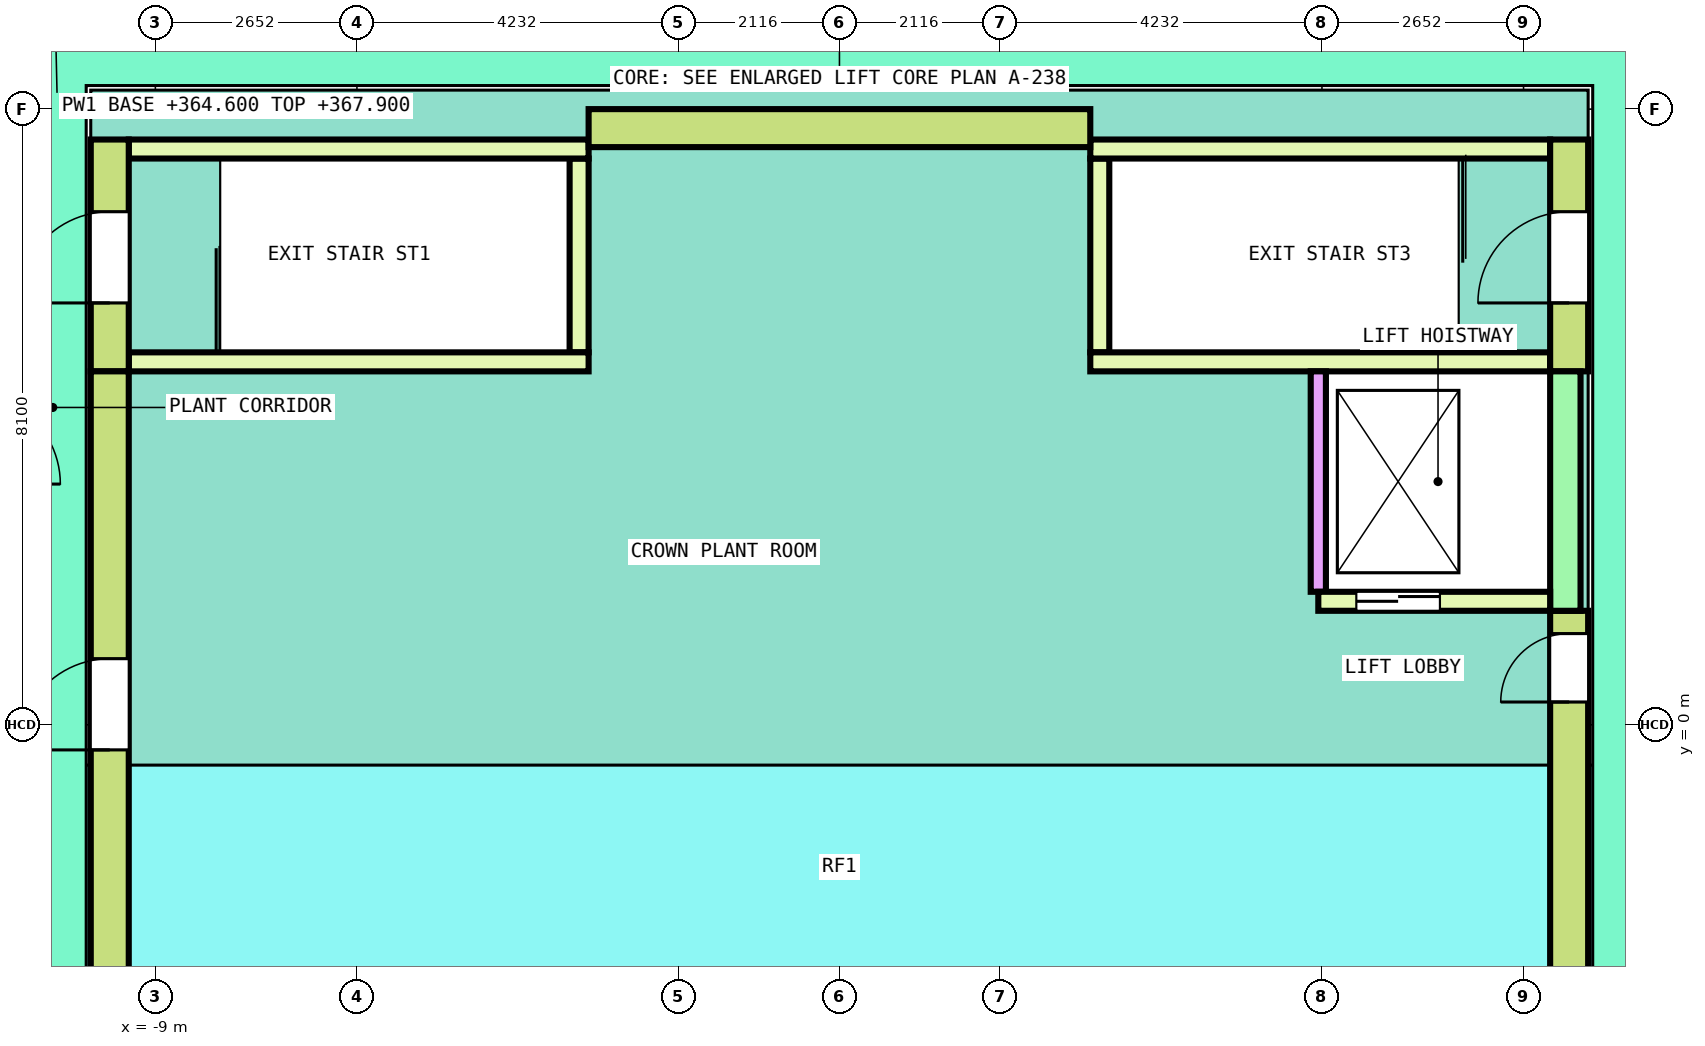
"""IFC4 building model, lengths in metres.
Left out: names, types, materials, properties, quantities, classifications, styles, units other than length and angle.
Written with IfcOpenShell. Run it as: python <this file> out.ifc"""

import sys

from ifc_helpers import new_model, si_unit, direction, frame, frame_2d, origin, place, context, subcontext, project, spatial, polyline, rectangle, outline, extrude, element, fill, save


model = new_model("IFC4")
c1 = context("Model", 3, precision=1e-05, world=origin(), true_north=direction((0.0, 1.0)))
c2 = subcontext(c1, "Body", "Model", "MODEL_VIEW")
j1 = project(units=[si_unit("LENGTHUNIT", "METRE"), si_unit("PLANEANGLEUNIT", "RADIAN")], contexts=[c1])
p1 = place(None, origin())
s1 = spatial("IfcSite", under=j1, at=p1, CompositionType="ELEMENT")
p2 = place(p1, origin())
s2 = spatial("IfcBuilding", under=s1, at=p2, CompositionType="ELEMENT")
p3 = place(p2, frame((0.0, 0.0, 364.6)))
s3 = spatial("IfcBuildingStorey", under=s2, at=p3, CompositionType="ELEMENT", Elevation=364.6)
p4 = place(p3, frame((9.6, -4.13, 0.0), z_axis=(0.0, 0.0, 1.0), x_axis=(0.0, 1.0, 0.0)))
e1 = element("IfcWall", 1, at=p4, inside=s3, PredefinedType="SHEAR", context=c2, shape_type="SweptSolid", body=[
    extrude(outline(polyline([(0.0, 0.0), (5.63, 0.0), (5.63, 3.8), (3.6, 3.8), (0.0, 0.4), (0.0, 0.0)])), frame((0.0, 0.25, 0.0), z_axis=(0.0, -1.0, 0.0), x_axis=(1.0, 0.0, 0.0)), (0.0, 0.0, 1.0), 0.5),
])
p5 = place(p4, frame((4.43, 0.0, 0.0)))
e2 = element("IfcOpeningElement", 2, at=p5, cuts=e1, PredefinedType="OPENING", context=c2, shape_type="SweptSolid", body=[
    extrude(rectangle(XDim=0.9, YDim=2.1, at=frame_2d((0.45, 1.05))), frame((0.0, 0.26, 0.0), z_axis=(0.0, -1.0, 0.0), x_axis=(1.0, 0.0, 0.0)), (0.0, 0.0, 1.0), 0.52),
])
p6 = place(p3, frame((3.3, 7.85, 0.0), z_axis=(0.0, 0.0, 1.0), x_axis=(-1.0, 0.0, 0.0)))
e3 = element("IfcWall", 3, at=p6, inside=s3, PredefinedType="SHEAR", context=c2, shape_type="SweptSolid", body=[
    extrude(rectangle(XDim=6.6, YDim=0.5, at=frame_2d((3.3, 0.0))), origin(), (0.0, 0.0, 1.0), 3.8),
])
p7 = place(p3, frame((-9.6, 4.65, 0.0), z_axis=(0.0, 0.0, 1.0), x_axis=(0.0, -1.0, 0.0)))
e4 = element("IfcWall", 4, at=p7, inside=s3, PredefinedType="SHEAR", context=c2, shape_type="SweptSolid", body=[
    extrude(outline(polyline([(0.0, 0.0), (8.78, 0.0), (8.78, 0.4), (5.18, 3.8), (0.0, 3.8), (0.0, 0.0)])), frame((0.0, 0.25, 0.0), z_axis=(0.0, -1.0, 0.0), x_axis=(1.0, 0.0, 0.0)), (0.0, 0.0, 1.0), 0.5),
])
p8 = place(p7, frame((3.78, 0.0, 0.0)))
e5 = element("IfcOpeningElement", 5, at=p8, cuts=e4, PredefinedType="OPENING", context=c2, shape_type="SweptSolid", body=[
    extrude(rectangle(XDim=1.2, YDim=2.1, at=frame_2d((0.6, 1.05))), frame((0.0, 0.26, 0.0), z_axis=(0.0, -1.0, 0.0), x_axis=(1.0, 0.0, 0.0)), (0.0, 0.0, 1.0), 0.52),
])
p9 = place(p3, frame((-9.6, 4.65, 0.0), z_axis=(0.0, 0.0, 1.0), x_axis=(0.0, 1.0, 0.0)))
e6 = element("IfcWall", 6, at=p9, inside=s3, PredefinedType="SHEAR", context=c2, shape_type="SweptSolid", body=[
    extrude(rectangle(XDim=3.05, YDim=0.5, at=frame_2d((1.525, 0.0))), origin(), (0.0, 0.0, 1.0), 3.8),
])
p10 = place(p9, frame((0.9, 0.0, 0.0)))
e7 = element("IfcOpeningElement", 7, at=p10, cuts=e6, PredefinedType="OPENING", context=c2, shape_type="SweptSolid", body=[
    extrude(rectangle(XDim=1.2, YDim=2.1, at=frame_2d((0.6, 1.05))), frame((0.0, 0.26, 0.0), z_axis=(0.0, -1.0, 0.0), x_axis=(1.0, 0.0, 0.0)), (0.0, 0.0, 1.0), 0.52),
])
p11 = place(p3, frame((-3.425, 4.9, 0.0), z_axis=(0.0, 0.0, 1.0), x_axis=(0.0, 1.0, 0.0)))
e8 = element("IfcWall", 8, at=p11, inside=s3, PredefinedType="SOLIDWALL", context=c2, shape_type="SweptSolid", body=[
    extrude(rectangle(XDim=2.55, YDim=0.25, at=frame_2d((1.275, 0.0))), origin(), (0.0, 0.0, 1.0), 3.8),
])
for number, where, z_axis, x_axis in (
    (9, (-9.35, 4.775, 0.0), (0.0, 0.0, 1.0), (1.0, 0.0, 0.0)),
    (10, (-9.35, 7.575, 0.0), (0.0, 0.0, 1.0), (1.0, 0.0, 0.0)),
):
    element("IfcWall", number, at=place(p3, frame(where, z_axis=z_axis, x_axis=x_axis)), inside=s3, PredefinedType="SOLIDWALL", context=c2, shape_type="SweptSolid", body=[
        extrude(rectangle(XDim=6.05, YDim=0.25, at=frame_2d((3.025, 0.0))), origin(), (0.0, 0.0, 1.0), 3.8),
    ])
p12 = place(p3, frame((9.6, 4.65, 0.0), z_axis=(0.0, 0.0, 1.0), x_axis=(0.0, 1.0, 0.0)))
e11 = element("IfcWall", 11, at=p12, inside=s3, PredefinedType="SHEAR", context=c2, shape_type="SweptSolid", body=[
    extrude(rectangle(XDim=3.05, YDim=0.5, at=frame_2d((1.525, 0.0))), origin(), (0.0, 0.0, 1.0), 3.8),
])
p13 = place(p12, frame((0.9, 0.0, 0.0)))
e12 = element("IfcOpeningElement", 12, at=p13, cuts=e11, PredefinedType="OPENING", context=c2, shape_type="SweptSolid", body=[
    extrude(rectangle(XDim=1.2, YDim=2.1, at=frame_2d((0.6, 1.05))), frame((0.0, 0.26, 0.0), z_axis=(0.0, -1.0, 0.0), x_axis=(1.0, 0.0, 0.0)), (0.0, 0.0, 1.0), 0.52),
])
p14 = place(p3, frame((3.425, 4.9, 0.0), z_axis=(0.0, 0.0, 1.0), x_axis=(0.0, 1.0, 0.0)))
e13 = element("IfcWall", 13, at=p14, inside=s3, PredefinedType="SOLIDWALL", context=c2, shape_type="SweptSolid", body=[
    extrude(rectangle(XDim=2.55, YDim=0.25, at=frame_2d((1.275, 0.0))), origin(), (0.0, 0.0, 1.0), 3.8),
])
for number, where, z_axis, x_axis in (
    (14, (3.3, 4.775, 0.0), (0.0, 0.0, 1.0), (1.0, 0.0, 0.0)),
    (15, (3.3, 7.575, 0.0), (0.0, 0.0, 1.0), (1.0, 0.0, 0.0)),
):
    element("IfcWall", number, at=place(p3, frame(where, z_axis=z_axis, x_axis=x_axis)), inside=s3, PredefinedType="SOLIDWALL", context=c2, shape_type="SweptSolid", body=[
        extrude(rectangle(XDim=6.05, YDim=0.25, at=frame_2d((3.025, 0.0))), origin(), (0.0, 0.0, 1.0), 3.8),
    ])
p15 = place(p3, frame((6.3, 1.625, 0.0), z_axis=(0.0, 0.0, 1.0), x_axis=(1.0, 0.0, 0.0)))
e16 = element("IfcWall", 16, at=p15, inside=s3, PredefinedType="SOLIDWALL", context=c2, shape_type="SweptSolid", body=[
    extrude(rectangle(XDim=3.05, YDim=0.25, at=frame_2d((1.525, 0.0))), origin(), (0.0, 0.0, 1.0), 3.8),
])
p16 = place(p15, frame((0.5, 0.0, 0.0)))
e17 = element("IfcOpeningElement", 17, at=p16, cuts=e16, PredefinedType="OPENING", context=c2, shape_type="SweptSolid", body=[
    extrude(rectangle(XDim=1.1, YDim=2.1, at=frame_2d((0.55, 1.05))), frame((0.0, 0.135, 0.0), z_axis=(0.0, -1.0, 0.0), x_axis=(1.0, 0.0, 0.0)), (0.0, 0.0, 1.0), 0.27),
])
p17 = place(p3, frame((6.3, 1.75, 0.0), z_axis=(0.0, 0.0, 1.0), x_axis=(0.0, 1.0, 0.0)))
e18 = element("IfcWall", 18, at=p17, inside=s3, PredefinedType="SOLIDWALL", context=c2, shape_type="SweptSolid", body=[
    extrude(rectangle(XDim=2.9, YDim=0.2, at=frame_2d((1.45, 0.0))), origin(), (0.0, 0.0, 1.0), 3.8),
])
p18 = place(p3, frame((9.55, 1.5, 0.0), z_axis=(0.0, 0.0, 1.0), x_axis=(0.0, 1.0, 0.0)))
e19 = element("IfcWall", 19, at=p18, inside=s3, PredefinedType="SHEAR", context=c2, shape_type="SweptSolid", body=[
    extrude(rectangle(XDim=3.15, YDim=0.4, at=frame_2d((1.575, 0.0))), origin(), (0.0, 0.0, 1.0), 3.8),
])
p19 = place(p10, origin())
e20 = element("IfcDoor", 20, at=p19, inside=s3, OperationType="SINGLE_SWING_LEFT", PredefinedType="DOOR", context=c2, shape_type="SweptSolid", body=[
    extrude(rectangle(XDim=1.2, YDim=2.1, at=frame_2d((0.6, 1.05))), frame((0.0, 0.2, 0.0), z_axis=(0.0, -1.0, 0.0), x_axis=(1.0, 0.0, 0.0)), (0.0, 0.0, 1.0), 0.4),
])
fill(e7, e20)
p20 = place(p13, origin())
e21 = element("IfcDoor", 21, at=p20, inside=s3, OperationType="SINGLE_SWING_RIGHT", PredefinedType="DOOR", context=c2, shape_type="SweptSolid", body=[
    extrude(rectangle(XDim=1.2, YDim=2.1, at=frame_2d((0.6, 1.05))), frame((0.0, 0.2, 0.0), z_axis=(0.0, -1.0, 0.0), x_axis=(1.0, 0.0, 0.0)), (0.0, 0.0, 1.0), 0.4),
])
fill(e12, e21)
p21 = place(p16, origin())
e22 = element("IfcDoor", 22, at=p21, inside=s3, OperationType="DOUBLE_DOOR_SLIDING", PredefinedType="DOOR", context=c2, shape_type="SweptSolid", body=[
    extrude(rectangle(XDim=1.1, YDim=2.1, at=frame_2d((0.55, 1.05))), frame((0.0, 0.075, 0.0), z_axis=(0.0, -1.0, 0.0), x_axis=(1.0, 0.0, 0.0)), (0.0, 0.0, 1.0), 0.15),
])
fill(e17, e22)
p22 = place(p5, origin())
e23 = element("IfcDoor", 23, at=p22, inside=s3, OperationType="SINGLE_SWING_RIGHT", PredefinedType="DOOR", context=c2, shape_type="SweptSolid", body=[
    extrude(rectangle(XDim=0.9, YDim=2.1, at=frame_2d((0.45, 1.05))), frame((0.0, 0.2, 0.0), z_axis=(0.0, -1.0, 0.0), x_axis=(1.0, 0.0, 0.0)), (0.0, 0.0, 1.0), 0.4),
])
fill(e2, e23)
p23 = place(p8, origin())
e24 = element("IfcDoor", 24, at=p23, inside=s3, OperationType="SINGLE_SWING_LEFT", PredefinedType="DOOR", context=c2, shape_type="SweptSolid", body=[
    extrude(rectangle(XDim=1.2, YDim=2.1, at=frame_2d((0.6, 1.05))), frame((0.0, 0.2, 0.0), z_axis=(0.0, -1.0, 0.0), x_axis=(1.0, 0.0, 0.0)), (0.0, 0.0, 1.0), 0.4),
])
fill(e5, e24)
save(model, sys.argv[1])
